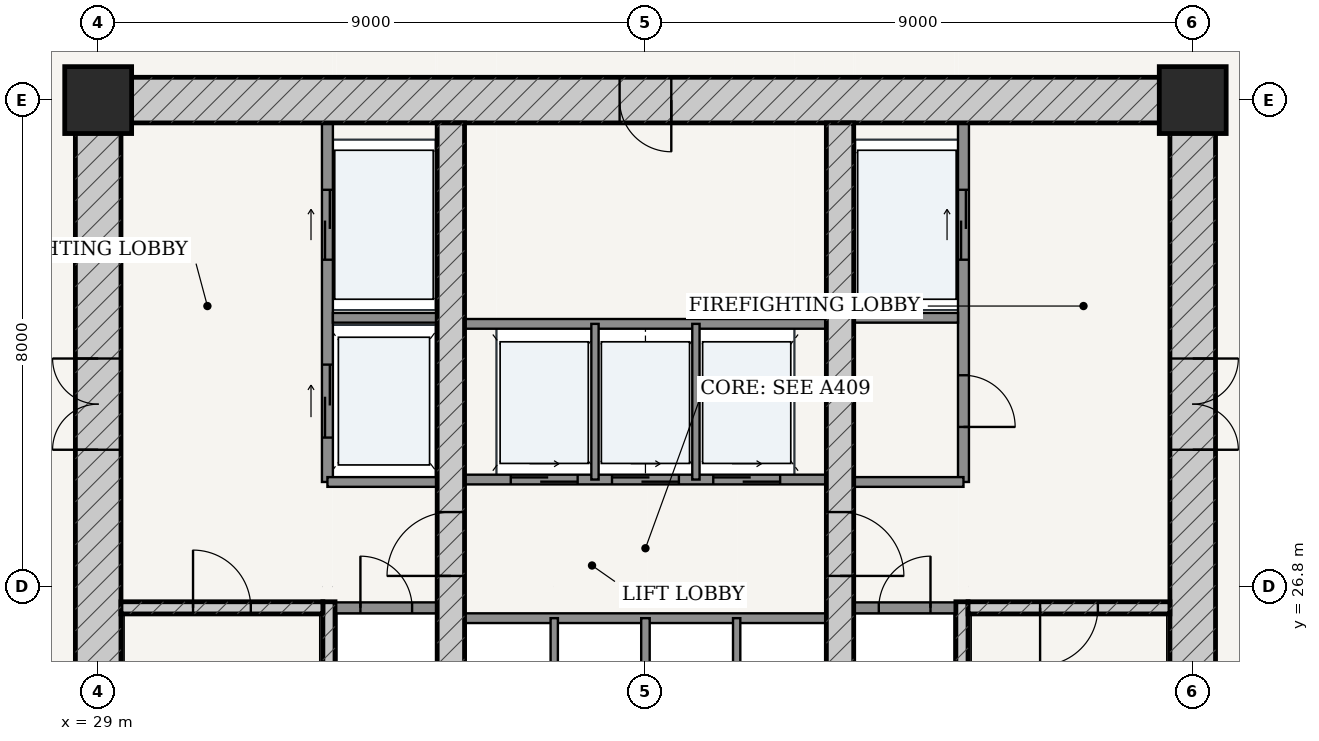
"""IFC4 building model, lengths in metres.
Left out: names, types, materials, properties, quantities, classifications, styles, units other than length and angle.
Written with IfcOpenShell. Run it as: python <this file> out.ifc"""

import sys

from ifc_helpers import new_model, si_unit, direction, frame, frame_2d, origin, origin_2d, place, context, subcontext, project, spatial, rectangle, extrude, source, transform, mapped, element, fill, save


model = new_model("IFC4")
c1 = context("Model", 3, precision=1e-05, world=origin(), true_north=direction((-0.2419218956, 0.970295726276)))
c2 = subcontext(c1, "Body", "Model", "MODEL_VIEW")
j1 = project(units=[si_unit("LENGTHUNIT", "METRE"), si_unit("PLANEANGLEUNIT", "RADIAN")], contexts=[c1])
p1 = place(None, origin())
s1 = spatial("IfcSite", under=j1, at=p1, CompositionType="ELEMENT")
p2 = place(p1, origin())
s2 = spatial("IfcBuilding", under=s1, at=p2, CompositionType="ELEMENT")
p3 = place(p2, frame((0.0, 0.0, 31.2)))
s3 = spatial("IfcBuildingStorey", under=s2, at=p3, CompositionType="ELEMENT", Elevation=31.2)
for number, where, z_axis, x_axis in (
    (1, (47.0, 34.8, 0.0), (0.0, 0.0, 1.0), (1.0, 0.0, 0.0)),
    (2, (29.0, 34.8, 0.0), (0.0, 0.0, 1.0), (1.0, 0.0, 0.0)),
):
    element("IfcColumn", number, at=place(p3, frame(where, z_axis=z_axis, x_axis=x_axis)), inside=s3, PredefinedType="COLUMN", context=c2, shape_type="SweptSolid", body=[
        extrude(rectangle(XDim=1.1, YDim=1.1, at=origin_2d()), origin(), (0.0, 0.0, 1.0), 3.6),
    ])
p4 = place(p3, frame((28.625, 34.8, 0.0), z_axis=(0.0, 0.0, 1.0), x_axis=(1.0, 0.0, 0.0)))
e3 = element("IfcWall", 3, at=p4, inside=s3, PredefinedType="SHEAR", context=c2, shape_type="SweptSolid", body=[
    extrude(rectangle(XDim=18.75, YDim=0.75, at=frame_2d((9.375, 0.0))), origin(), (0.0, 0.0, 1.0), 3.32),
])
p5 = place(p4, frame((8.95, 0.0, 0.0)))
e4 = element("IfcOpeningElement", 4, at=p5, cuts=e3, PredefinedType="OPENING", context=c2, shape_type="SweptSolid", body=[
    extrude(rectangle(XDim=0.85, YDim=2.1, at=frame_2d((0.425, 1.05))), frame((0.0, 0.385, 0.0), z_axis=(0.0, -1.0, 0.0), x_axis=(1.0, 0.0, 0.0)), (0.0, 0.0, 1.0), 0.77),
])
p6 = place(p3, frame((29.0, 19.175, 0.0), z_axis=(0.0, 0.0, 1.0), x_axis=(0.0, 1.0, 0.0)))
e5 = element("IfcWall", 5, at=p6, inside=s3, PredefinedType="SHEAR", context=c2, shape_type="SweptSolid", body=[
    extrude(rectangle(XDim=15.25, YDim=0.75, at=frame_2d((7.625, 0.0))), origin(), (0.0, 0.0, 1.0), 3.32),
])
p7 = place(p6, frame((9.875, 0.0, 0.0)))
e6 = element("IfcOpeningElement", 6, at=p7, cuts=e5, PredefinedType="OPENING", context=c2, shape_type="SweptSolid", body=[
    extrude(rectangle(XDim=1.5, YDim=2.2, at=frame_2d((0.75, 1.1))), frame((0.0, 0.385, 0.0), z_axis=(0.0, -1.0, 0.0), x_axis=(1.0, 0.0, 0.0)), (0.0, 0.0, 1.0), 0.77),
])
p8 = place(p3, frame((47.0, 19.175, 0.0), z_axis=(0.0, 0.0, 1.0), x_axis=(0.0, 1.0, 0.0)))
e7 = element("IfcWall", 7, at=p8, inside=s3, PredefinedType="SHEAR", context=c2, shape_type="SweptSolid", body=[
    extrude(rectangle(XDim=15.25, YDim=0.75, at=frame_2d((7.625, 0.0))), origin(), (0.0, 0.0, 1.0), 3.32),
])
p9 = place(p8, frame((9.875, 0.0, 0.0)))
e8 = element("IfcOpeningElement", 8, at=p9, cuts=e7, PredefinedType="OPENING", context=c2, shape_type="SweptSolid", body=[
    extrude(rectangle(XDim=1.5, YDim=2.2, at=frame_2d((0.75, 1.1))), frame((0.0, 0.385, 0.0), z_axis=(0.0, -1.0, 0.0), x_axis=(1.0, 0.0, 0.0)), (0.0, 0.0, 1.0), 0.77),
])
p10 = place(p3, frame((32.795, 19.175, 0.0), z_axis=(0.0, 0.0, 1.0), x_axis=(0.0, 1.0, 0.0)))
e9 = element("IfcWall", 9, at=p10, inside=s3, PredefinedType="SOLIDWALL", context=c2, shape_type="SweptSolid", body=[
    extrude(rectangle(XDim=7.375, YDim=0.2, at=frame_2d((3.688, 0.0))), origin(), (0.0, 0.0, 1.0), 3.32),
])
p11 = place(p3, frame((29.375, 26.45, 0.0), z_axis=(0.0, 0.0, 1.0), x_axis=(1.0, 0.0, 0.0)))
e10 = element("IfcWall", 10, at=p11, inside=s3, PredefinedType="SOLIDWALL", context=c2, shape_type="SweptSolid", body=[
    extrude(rectangle(XDim=3.32, YDim=0.2, at=frame_2d((1.66, 0.0))), origin(), (0.0, 0.0, 1.0), 3.32),
])
p12 = place(p11, frame((1.185, 0.0, 0.0)))
e11 = element("IfcOpeningElement", 11, at=p12, cuts=e10, PredefinedType="OPENING", context=c2, shape_type="SweptSolid", body=[
    extrude(rectangle(XDim=0.95, YDim=2.15, at=frame_2d((0.475, 1.075))), frame((0.0, 0.11, 0.0), z_axis=(0.0, -1.0, 0.0), x_axis=(1.0, 0.0, 0.0)), (0.0, 0.0, 1.0), 0.22),
])
p13 = place(p3, frame((43.205, 19.175, 0.0), z_axis=(0.0, 0.0, 1.0), x_axis=(0.0, 1.0, 0.0)))
e12 = element("IfcWall", 12, at=p13, inside=s3, PredefinedType="SOLIDWALL", context=c2, shape_type="SweptSolid", body=[
    extrude(rectangle(XDim=7.375, YDim=0.2, at=frame_2d((3.688, 0.0))), origin(), (0.0, 0.0, 1.0), 3.32),
])
p14 = place(p3, frame((43.305, 26.45, 0.0), z_axis=(0.0, 0.0, 1.0), x_axis=(1.0, 0.0, 0.0)))
e13 = element("IfcWall", 13, at=p14, inside=s3, PredefinedType="SOLIDWALL", context=c2, shape_type="SweptSolid", body=[
    extrude(rectangle(XDim=3.32, YDim=0.2, at=frame_2d((1.66, 0.0))), origin(), (0.0, 0.0, 1.0), 3.32),
])
p15 = place(p14, frame((1.185, 0.0, 0.0)))
e14 = element("IfcOpeningElement", 14, at=p15, cuts=e13, PredefinedType="OPENING", context=c2, shape_type="SweptSolid", body=[
    extrude(rectangle(XDim=0.95, YDim=2.15, at=frame_2d((0.475, 1.075))), frame((0.0, 0.11, 0.0), z_axis=(0.0, -1.0, 0.0), x_axis=(1.0, 0.0, 0.0)), (0.0, 0.0, 1.0), 0.22),
])
p16 = place(p3, frame((34.8, 19.175, 0.0), z_axis=(0.0, 0.0, 1.0), x_axis=(0.0, 1.0, 0.0)))
e15 = element("IfcWall", 15, at=p16, inside=s3, PredefinedType="SHEAR", context=c2, shape_type="SweptSolid", body=[
    extrude(rectangle(XDim=15.25, YDim=0.45, at=frame_2d((7.625, 0.0))), origin(), (0.0, 0.0, 1.0), 3.32),
])
p17 = place(p16, frame((7.8, 0.0, 0.0)))
e16 = element("IfcOpeningElement", 16, at=p17, cuts=e15, PredefinedType="OPENING", context=c2, shape_type="SweptSolid", body=[
    extrude(rectangle(XDim=1.05, YDim=2.15, at=frame_2d((0.525, 1.075))), frame((0.0, 0.235, 0.0), z_axis=(0.0, -1.0, 0.0), x_axis=(1.0, 0.0, 0.0)), (0.0, 0.0, 1.0), 0.47),
])
p18 = place(p3, frame((41.2, 19.175, 0.0), z_axis=(0.0, 0.0, 1.0), x_axis=(0.0, 1.0, 0.0)))
e17 = element("IfcWall", 17, at=p18, inside=s3, PredefinedType="SHEAR", context=c2, shape_type="SweptSolid", body=[
    extrude(rectangle(XDim=15.25, YDim=0.45, at=frame_2d((7.625, 0.0))), origin(), (0.0, 0.0, 1.0), 3.32),
])
p19 = place(p18, frame((7.8, 0.0, 0.0)))
e18 = element("IfcOpeningElement", 18, at=p19, cuts=e17, PredefinedType="OPENING", context=c2, shape_type="SweptSolid", body=[
    extrude(rectangle(XDim=1.05, YDim=2.15, at=frame_2d((0.525, 1.075))), frame((0.0, 0.235, 0.0), z_axis=(0.0, -1.0, 0.0), x_axis=(1.0, 0.0, 0.0)), (0.0, 0.0, 1.0), 0.47),
])
p20 = place(p3, frame((32.9, 26.45, 0.0), z_axis=(0.0, 0.0, 1.0), x_axis=(1.0, 0.0, 0.0)))
e19 = element("IfcWall", 19, at=p20, inside=s3, PredefinedType="PARTITIONING", context=c2, shape_type="SweptSolid", body=[
    extrude(rectangle(XDim=1.675, YDim=0.18, at=frame_2d((0.837, 0.0))), origin(), (0.0, 0.0, 1.0), 3.32),
])
p21 = place(p20, frame((0.413, 0.0, 0.0)))
e20 = element("IfcOpeningElement", 20, at=p21, cuts=e19, PredefinedType="OPENING", context=c2, shape_type="SweptSolid", body=[
    extrude(rectangle(XDim=0.85, YDim=2.1, at=frame_2d((0.425, 1.05))), frame((0.0, 0.1, 0.0), z_axis=(0.0, -1.0, 0.0), x_axis=(1.0, 0.0, 0.0)), (0.0, 0.0, 1.0), 0.2),
])
p22 = place(p3, frame((41.425, 26.45, 0.0), z_axis=(0.0, 0.0, 1.0), x_axis=(1.0, 0.0, 0.0)))
e21 = element("IfcWall", 21, at=p22, inside=s3, PredefinedType="PARTITIONING", context=c2, shape_type="SweptSolid", body=[
    extrude(rectangle(XDim=1.675, YDim=0.18, at=frame_2d((0.837, 0.0))), origin(), (0.0, 0.0, 1.0), 3.32),
])
p23 = place(p22, frame((0.413, 0.0, 0.0)))
e22 = element("IfcOpeningElement", 22, at=p23, cuts=e21, PredefinedType="OPENING", context=c2, shape_type="SweptSolid", body=[
    extrude(rectangle(XDim=0.85, YDim=2.1, at=frame_2d((0.425, 1.05))), frame((0.0, 0.1, 0.0), z_axis=(0.0, -1.0, 0.0), x_axis=(1.0, 0.0, 0.0)), (0.0, 0.0, 1.0), 0.2),
])
p24 = place(p3, frame((32.77, 28.52, 0.0), z_axis=(0.0, 0.0, 1.0), x_axis=(0.0, 1.0, 0.0)))
e23 = element("IfcWall", 23, at=p24, inside=s3, PredefinedType="PARTITIONING", context=c2, shape_type="SweptSolid", body=[
    extrude(rectangle(XDim=5.905, YDim=0.18, at=frame_2d((2.953, 0.0))), origin(), (0.0, 0.0, 1.0), 3.32),
])
p25 = place(p24, frame((3.655, 0.0, 0.0)))
e24 = element("IfcOpeningElement", 24, at=p25, cuts=e23, PredefinedType="OPENING", context=c2, shape_type="SweptSolid", body=[
    extrude(rectangle(XDim=1.15, YDim=2.2, at=frame_2d((0.575, 1.1))), frame((0.0, 0.1, 0.0), z_axis=(0.0, -1.0, 0.0), x_axis=(1.0, 0.0, 0.0)), (0.0, 0.0, 1.0), 0.2),
])
p26 = place(p24, frame((0.73, 0.0, 0.0)))
e25 = element("IfcOpeningElement", 25, at=p26, cuts=e23, PredefinedType="OPENING", context=c2, shape_type="SweptSolid", body=[
    extrude(rectangle(XDim=1.2, YDim=2.25, at=frame_2d((0.6, 1.125))), frame((0.0, 0.1, 0.0), z_axis=(0.0, -1.0, 0.0), x_axis=(1.0, 0.0, 0.0)), (0.0, 0.0, 1.0), 0.2),
])
p27 = place(p3, frame((32.86, 31.22, 0.0), z_axis=(0.0, 0.0, 1.0), x_axis=(1.0, 0.0, 0.0)))
e26 = element("IfcWall", 26, at=p27, inside=s3, PredefinedType="PARTITIONING", context=c2, shape_type="SweptSolid", body=[
    extrude(rectangle(XDim=1.715, YDim=0.16, at=frame_2d((0.857, 0.0))), origin(), (0.0, 0.0, 1.0), 3.32),
])
p28 = place(p3, frame((32.77, 28.52, 0.0), z_axis=(0.0, 0.0, 1.0), x_axis=(1.0, 0.0, 0.0)))
e27 = element("IfcWall", 27, at=p28, inside=s3, PredefinedType="PARTITIONING", context=c2, shape_type="SweptSolid", body=[
    extrude(rectangle(XDim=1.805, YDim=0.16, at=frame_2d((0.902, 0.0))), origin(), (0.0, 0.0, 1.0), 3.32),
])
p29 = place(p3, frame((43.23, 28.52, 0.0), z_axis=(0.0, 0.0, 1.0), x_axis=(0.0, 1.0, 0.0)))
e28 = element("IfcWall", 28, at=p29, inside=s3, PredefinedType="PARTITIONING", context=c2, shape_type="SweptSolid", body=[
    extrude(rectangle(XDim=5.905, YDim=0.18, at=frame_2d((2.953, 0.0))), origin(), (0.0, 0.0, 1.0), 3.32),
])
p30 = place(p29, frame((0.905, 0.0, 0.0)))
e29 = element("IfcOpeningElement", 29, at=p30, cuts=e28, PredefinedType="OPENING", context=c2, shape_type="SweptSolid", body=[
    extrude(rectangle(XDim=0.85, YDim=2.1, at=frame_2d((0.425, 1.05))), frame((0.0, 0.1, 0.0), z_axis=(0.0, -1.0, 0.0), x_axis=(1.0, 0.0, 0.0)), (0.0, 0.0, 1.0), 0.2),
])
p31 = place(p29, frame((3.655, 0.0, 0.0)))
e30 = element("IfcOpeningElement", 30, at=p31, cuts=e28, PredefinedType="OPENING", context=c2, shape_type="SweptSolid", body=[
    extrude(rectangle(XDim=1.15, YDim=2.2, at=frame_2d((0.575, 1.1))), frame((0.0, 0.1, 0.0), z_axis=(0.0, -1.0, 0.0), x_axis=(1.0, 0.0, 0.0)), (0.0, 0.0, 1.0), 0.2),
])
p32 = place(p3, frame((41.425, 31.22, 0.0), z_axis=(0.0, 0.0, 1.0), x_axis=(1.0, 0.0, 0.0)))
e31 = element("IfcWall", 31, at=p32, inside=s3, PredefinedType="PARTITIONING", context=c2, shape_type="SweptSolid", body=[
    extrude(rectangle(XDim=1.715, YDim=0.16, at=frame_2d((0.857, 0.0))), origin(), (0.0, 0.0, 1.0), 3.32),
])
p33 = place(p3, frame((41.425, 28.52, 0.0), z_axis=(0.0, 0.0, 1.0), x_axis=(1.0, 0.0, 0.0)))
e32 = element("IfcWall", 32, at=p33, inside=s3, PredefinedType="PARTITIONING", context=c2, shape_type="SweptSolid", body=[
    extrude(rectangle(XDim=1.805, YDim=0.16, at=frame_2d((0.902, 0.0))), origin(), (0.0, 0.0, 1.0), 3.32),
])
p34 = place(p3, frame((35.025, 28.56, 0.0), z_axis=(0.0, 0.0, 1.0), x_axis=(1.0, 0.0, 0.0)))
e33 = element("IfcWall", 33, at=p34, inside=s3, PredefinedType="PARTITIONING", context=c2, shape_type="SweptSolid", body=[
    extrude(rectangle(XDim=5.95, YDim=0.16, at=frame_2d((2.975, 0.0))), origin(), (0.0, 0.0, 1.0), 3.32),
])
p35 = place(p34, frame((0.76, 0.0, 0.0)))
e34 = element("IfcOpeningElement", 34, at=p35, cuts=e33, PredefinedType="OPENING", context=c2, shape_type="SweptSolid", body=[
    extrude(rectangle(XDim=1.1, YDim=2.2, at=frame_2d((0.55, 1.1))), frame((0.0, 0.09, 0.0), z_axis=(0.0, -1.0, 0.0), x_axis=(1.0, 0.0, 0.0)), (0.0, 0.0, 1.0), 0.18),
])
p36 = place(p34, frame((2.425, 0.0, 0.0)))
e35 = element("IfcOpeningElement", 35, at=p36, cuts=e33, PredefinedType="OPENING", context=c2, shape_type="SweptSolid", body=[
    extrude(rectangle(XDim=1.1, YDim=2.2, at=frame_2d((0.55, 1.1))), frame((0.0, 0.09, 0.0), z_axis=(0.0, -1.0, 0.0), x_axis=(1.0, 0.0, 0.0)), (0.0, 0.0, 1.0), 0.18),
])
p37 = place(p34, frame((4.09, 0.0, 0.0)))
e36 = element("IfcOpeningElement", 36, at=p37, cuts=e33, PredefinedType="OPENING", context=c2, shape_type="SweptSolid", body=[
    extrude(rectangle(XDim=1.1, YDim=2.2, at=frame_2d((0.55, 1.1))), frame((0.0, 0.09, 0.0), z_axis=(0.0, -1.0, 0.0), x_axis=(1.0, 0.0, 0.0)), (0.0, 0.0, 1.0), 0.18),
])
p38 = place(p3, frame((35.025, 31.12, 0.0), z_axis=(0.0, 0.0, 1.0), x_axis=(1.0, 0.0, 0.0)))
e37 = element("IfcWall", 37, at=p38, inside=s3, PredefinedType="PARTITIONING", context=c2, shape_type="SweptSolid", body=[
    extrude(rectangle(XDim=5.95, YDim=0.16, at=frame_2d((2.975, 0.0))), origin(), (0.0, 0.0, 1.0), 3.32),
])
for number, where, z_axis, x_axis in (
    (38, (37.17, 28.56, 0.0), (0.0, 0.0, 1.0), (0.0, 1.0, 0.0)),
    (39, (38.83, 28.56, 0.0), (0.0, 0.0, 1.0), (0.0, 1.0, 0.0)),
):
    element("IfcWall", number, at=place(p3, frame(where, z_axis=z_axis, x_axis=x_axis)), inside=s3, PredefinedType="PARTITIONING", context=c2, shape_type="SweptSolid", body=[
        extrude(rectangle(XDim=2.56, YDim=0.12, at=frame_2d((1.28, 0.0))), origin(), (0.0, 0.0, 1.0), 3.32),
    ])
p39 = place(p3, frame((35.025, 26.28, 0.0), z_axis=(0.0, 0.0, 1.0), x_axis=(1.0, 0.0, 0.0)))
e40 = element("IfcWall", 40, at=p39, inside=s3, PredefinedType="PARTITIONING", context=c2, shape_type="SweptSolid", body=[
    extrude(rectangle(XDim=5.95, YDim=0.16, at=frame_2d((2.975, 0.0))), origin(), (0.0, 0.0, 1.0), 3.32),
])
p40 = place(p3, frame((36.5, 23.72, 0.0), z_axis=(0.0, 0.0, 1.0), x_axis=(0.0, 1.0, 0.0)))
e41 = element("IfcWall", 41, at=p40, inside=s3, PredefinedType="PARTITIONING", context=c2, shape_type="SweptSolid", body=[
    extrude(rectangle(XDim=2.56, YDim=0.12, at=frame_2d((1.28, 0.0))), origin(), (0.0, 0.0, 1.0), 3.32),
])
p41 = place(p3, frame((38.0, 23.72, 0.0), z_axis=(0.0, 0.0, 1.0), x_axis=(0.0, 1.0, 0.0)))
e42 = element("IfcWall", 42, at=p41, inside=s3, PredefinedType="PARTITIONING", context=c2, shape_type="SweptSolid", body=[
    extrude(rectangle(XDim=2.56, YDim=0.14, at=frame_2d((1.28, 0.0))), origin(), (0.0, 0.0, 1.0), 3.32),
])
p42 = place(p3, frame((39.5, 23.72, 0.0), z_axis=(0.0, 0.0, 1.0), x_axis=(0.0, 1.0, 0.0)))
e43 = element("IfcWall", 43, at=p42, inside=s3, PredefinedType="PARTITIONING", context=c2, shape_type="SweptSolid", body=[
    extrude(rectangle(XDim=2.56, YDim=0.12, at=frame_2d((1.28, 0.0))), origin(), (0.0, 0.0, 1.0), 3.32),
])
m1 = source(origin(), c2, "Body", "SweptSolid", [
    extrude(rectangle(XDim=1.5, YDim=2.2, at=frame_2d((0.75, 1.1))), frame((0.0, 0.025, 0.0), z_axis=(0.0, -1.0, 0.0), x_axis=(1.0, 0.0, 0.0)), (0.0, 0.0, 1.0), 0.05),
])
p43 = place(p7, origin())
e44 = element("IfcDoor", 44, at=p43, inside=s3, OperationType="DOUBLE_DOOR_SINGLE_SWING", PredefinedType="DOOR", context=c2, shape_type="MappedRepresentation", body=[
    mapped(m1, transform((0.0, 0.0, 0.0), scale=1.0)),
])
fill(e6, e44)
p44 = place(p9, frame((1.5, 0.0, 0.0), z_axis=(0.0, 0.0, 1.0), x_axis=(-1.0, 0.0, 0.0)))
e45 = element("IfcDoor", 45, at=p44, inside=s3, OperationType="DOUBLE_DOOR_SINGLE_SWING", PredefinedType="DOOR", context=c2, shape_type="MappedRepresentation", body=[
    mapped(m1, transform((0.0, 0.0, 0.0), scale=1.0)),
])
fill(e8, e45)
m2 = source(origin(), c2, "Body", "SweptSolid", [
    extrude(rectangle(XDim=1.05, YDim=2.15, at=frame_2d((0.525, 1.075))), frame((0.0, 0.025, 0.0), z_axis=(0.0, -1.0, 0.0), x_axis=(1.0, 0.0, 0.0)), (0.0, 0.0, 1.0), 0.05),
])
p45 = place(p17, origin())
e46 = element("IfcDoor", 46, at=p45, inside=s3, OperationType="SINGLE_SWING_LEFT", PredefinedType="DOOR", context=c2, shape_type="MappedRepresentation", body=[
    mapped(m2, transform((0.0, 0.0, 0.0), scale=1.0)),
])
fill(e16, e46)
p46 = place(p19, frame((1.05, 0.0, 0.0), z_axis=(0.0, 0.0, 1.0), x_axis=(-1.0, 0.0, 0.0)))
e47 = element("IfcDoor", 47, at=p46, inside=s3, OperationType="SINGLE_SWING_RIGHT", PredefinedType="DOOR", context=c2, shape_type="MappedRepresentation", body=[
    mapped(m2, transform((0.0, 0.0, 0.0), scale=1.0)),
])
fill(e18, e47)
m3 = source(origin(), c2, "Body", "SweptSolid", [
    extrude(rectangle(XDim=0.95, YDim=2.15, at=frame_2d((0.475, 1.075))), frame((0.0, 0.025, 0.0), z_axis=(0.0, -1.0, 0.0), x_axis=(1.0, 0.0, 0.0)), (0.0, 0.0, 1.0), 0.05),
])
p47 = place(p12, origin())
e48 = element("IfcDoor", 48, at=p47, inside=s3, OperationType="SINGLE_SWING_LEFT", PredefinedType="DOOR", context=c2, shape_type="MappedRepresentation", body=[
    mapped(m3, transform((0.0, 0.0, 0.0), scale=1.0)),
])
fill(e11, e48)
p48 = place(p15, frame((0.95, 0.0, 0.0), z_axis=(0.0, 0.0, 1.0), x_axis=(-1.0, 0.0, 0.0)))
e49 = element("IfcDoor", 49, at=p48, inside=s3, OperationType="SINGLE_SWING_RIGHT", PredefinedType="DOOR", context=c2, shape_type="MappedRepresentation", body=[
    mapped(m3, transform((0.0, 0.0, 0.0), scale=1.0)),
])
fill(e14, e49)
m4 = source(origin(), c2, "Body", "SweptSolid", [
    extrude(rectangle(XDim=0.85, YDim=2.1, at=frame_2d((0.425, 1.05))), frame((0.0, 0.025, 0.0), z_axis=(0.0, -1.0, 0.0), x_axis=(1.0, 0.0, 0.0)), (0.0, 0.0, 1.0), 0.05),
])
p49 = place(p21, origin())
e50 = element("IfcDoor", 50, at=p49, inside=s3, OperationType="SINGLE_SWING_LEFT", PredefinedType="DOOR", context=c2, shape_type="MappedRepresentation", body=[
    mapped(m4, transform((0.0, 0.0, 0.0), scale=1.0)),
])
fill(e20, e50)
p50 = place(p23, origin())
e51 = element("IfcDoor", 51, at=p50, inside=s3, OperationType="SINGLE_SWING_RIGHT", PredefinedType="DOOR", context=c2, shape_type="MappedRepresentation", body=[
    mapped(m4, transform((0.0, 0.0, 0.0), scale=1.0)),
])
fill(e22, e51)
p51 = place(p30, frame((0.85, 0.0, 0.0), z_axis=(0.0, 0.0, 1.0), x_axis=(-1.0, 0.0, 0.0)))
e52 = element("IfcDoor", 52, at=p51, inside=s3, OperationType="SINGLE_SWING_RIGHT", PredefinedType="DOOR", context=c2, shape_type="MappedRepresentation", body=[
    mapped(m4, transform((0.0, 0.0, 0.0), scale=1.0)),
])
fill(e29, e52)
p52 = place(p5, frame((0.85, 0.0, 0.0), z_axis=(0.0, 0.0, 1.0), x_axis=(-1.0, 0.0, 0.0)))
e53 = element("IfcDoor", 53, at=p52, inside=s3, OperationType="SINGLE_SWING_LEFT", PredefinedType="DOOR", context=c2, shape_type="MappedRepresentation", body=[
    mapped(m4, transform((0.0, 0.0, 0.0), scale=1.0)),
])
fill(e4, e53)
m5 = source(origin(), c2, "Body", "SweptSolid", [
    extrude(rectangle(XDim=1.15, YDim=2.2, at=frame_2d((0.575, 1.1))), frame((0.0, 0.025, 0.0), z_axis=(0.0, -1.0, 0.0), x_axis=(1.0, 0.0, 0.0)), (0.0, 0.0, 1.0), 0.05),
])
p53 = place(p25, origin())
e54 = element("IfcDoor", 54, at=p53, inside=s3, OperationType="DOUBLE_DOOR_SLIDING", PredefinedType="DOOR", context=c2, shape_type="MappedRepresentation", body=[
    mapped(m5, transform((0.0, 0.0, 0.0), scale=1.0)),
])
fill(e24, e54)
p54 = place(p31, origin())
e55 = element("IfcDoor", 55, at=p54, inside=s3, OperationType="DOUBLE_DOOR_SLIDING", PredefinedType="DOOR", context=c2, shape_type="MappedRepresentation", body=[
    mapped(m5, transform((0.0, 0.0, 0.0), scale=1.0)),
])
fill(e30, e55)
m6 = source(origin(), c2, "Body", "SweptSolid", [
    extrude(rectangle(XDim=1.2, YDim=2.25, at=frame_2d((0.6, 1.125))), frame((0.0, 0.025, 0.0), z_axis=(0.0, -1.0, 0.0), x_axis=(1.0, 0.0, 0.0)), (0.0, 0.0, 1.0), 0.05),
])
p55 = place(p26, origin())
e56 = element("IfcDoor", 56, at=p55, inside=s3, OperationType="DOUBLE_DOOR_SLIDING", PredefinedType="DOOR", context=c2, shape_type="MappedRepresentation", body=[
    mapped(m6, transform((0.0, 0.0, 0.0), scale=1.0)),
])
fill(e25, e56)
m7 = source(origin(), c2, "Body", "SweptSolid", [
    extrude(rectangle(XDim=1.1, YDim=2.2, at=frame_2d((0.55, 1.1))), frame((0.0, 0.025, 0.0), z_axis=(0.0, -1.0, 0.0), x_axis=(1.0, 0.0, 0.0)), (0.0, 0.0, 1.0), 0.05),
])
p56 = place(p35, origin())
e57 = element("IfcDoor", 57, at=p56, inside=s3, OperationType="DOUBLE_DOOR_SLIDING", PredefinedType="DOOR", context=c2, shape_type="MappedRepresentation", body=[
    mapped(m7, transform((0.0, 0.0, 0.0), scale=1.0)),
])
fill(e34, e57)
p57 = place(p36, origin())
e58 = element("IfcDoor", 58, at=p57, inside=s3, OperationType="DOUBLE_DOOR_SLIDING", PredefinedType="DOOR", context=c2, shape_type="MappedRepresentation", body=[
    mapped(m7, transform((0.0, 0.0, 0.0), scale=1.0)),
])
fill(e35, e58)
p58 = place(p37, origin())
e59 = element("IfcDoor", 59, at=p58, inside=s3, OperationType="DOUBLE_DOOR_SLIDING", PredefinedType="DOOR", context=c2, shape_type="MappedRepresentation", body=[
    mapped(m7, transform((0.0, 0.0, 0.0), scale=1.0)),
])
fill(e36, e59)
save(model, sys.argv[1])
